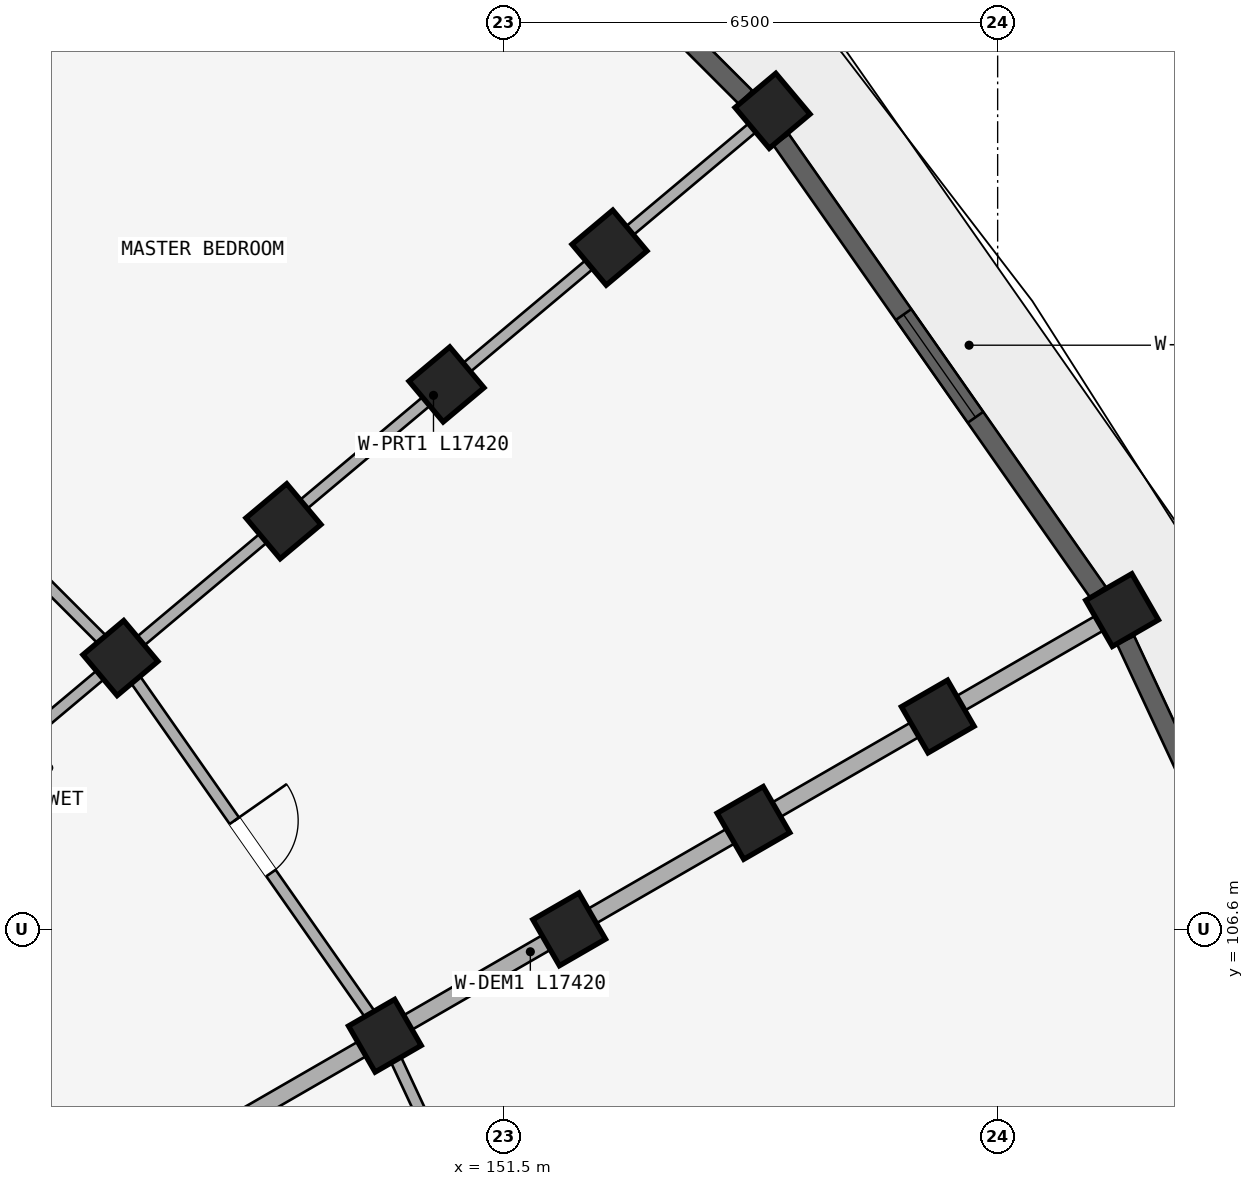
"""IFC4 building model, lengths in metres.
Left out: names, types, materials, properties, quantities, classifications, styles, units other than length and angle.
Written with IfcOpenShell. Run it as: python <this file> out.ifc"""

import sys

from ifc_helpers import new_model, si_unit, direction, frame, frame_2d, origin, origin_2d, place, context, subcontext, project, spatial, rectangle, extrude, element, fill, save


model = new_model("IFC4")
c1 = context("Model", 3, precision=1e-05, world=origin(), true_north=direction((0.0, 1.0)))
c2 = subcontext(c1, "Body", "Model", "MODEL_VIEW")
j1 = project(units=[si_unit("LENGTHUNIT", "METRE"), si_unit("PLANEANGLEUNIT", "RADIAN")], contexts=[c1])
p1 = place(None, origin())
s1 = spatial("IfcSite", under=j1, at=p1, CompositionType="ELEMENT")
p2 = place(p1, origin())
s2 = spatial("IfcBuilding", under=s1, at=p2, CompositionType="ELEMENT")
p3 = place(p2, frame((0.0, 0.0, 27.6)))
s3 = spatial("IfcBuildingStorey", under=s2, at=p3, CompositionType="ELEMENT", Elevation=27.6)
for number, where, z_axis, x_axis in (
    (1, (146.458, 110.169, 0.0), (0.0, 0.0, 1.0), (-0.643, 0.766, 0.0)),
    (2, (148.603, 111.969, 0.0), (0.0, 0.0, 1.0), (-0.643, 0.766, 0.0)),
    (3, (150.748, 113.769, 0.0), (0.0, 0.0, 1.0), (-0.643, 0.766, 0.0)),
    (4, (152.893, 115.568, 0.0), (0.0, 0.0, 1.0), (-0.643, 0.766, 0.0)),
):
    element("IfcColumn", number, at=place(p3, frame(where, z_axis=z_axis, x_axis=x_axis)), inside=s3, PredefinedType="COLUMN", context=c2, shape_type="SweptSolid", body=[
        extrude(rectangle(XDim=0.7, YDim=0.7, at=origin_2d()), origin(), (0.0, 0.0, 1.0), 2.93),
    ])
p4 = place(p3, frame((155.038, 117.368, 0.0), z_axis=(0.0, 0.0, 1.0), x_axis=(-0.642787609687, 0.766044443119, 0.0)))
e5 = element("IfcColumn", 5, at=p4, inside=s3, PredefinedType="COLUMN", context=c2, shape_type="SweptSolid", body=[
    extrude(rectangle(XDim=0.7, YDim=0.7, at=origin_2d()), origin(), (0.0, 0.0, 1.0), 2.97),
])
for number, where, z_axis, x_axis in (
    (6, (149.938, 105.2, 0.0), (0.0, 0.0, 1.0), (-0.5, 0.866, 0.0)),
    (7, (152.363, 106.6, 0.0), (0.0, 0.0, 1.0), (-0.5, 0.866, 0.0)),
    (8, (154.787, 108.0, 0.0), (0.0, 0.0, 1.0), (-0.5, 0.866, 0.0)),
    (9, (157.212, 109.4, 0.0), (0.0, 0.0, 1.0), (-0.5, 0.866, 0.0)),
):
    element("IfcColumn", number, at=place(p3, frame(where, z_axis=z_axis, x_axis=x_axis)), inside=s3, PredefinedType="COLUMN", context=c2, shape_type="SweptSolid", body=[
        extrude(rectangle(XDim=0.7, YDim=0.7, at=origin_2d()), origin(), (0.0, 0.0, 1.0), 2.93),
    ])
p5 = place(p3, frame((159.637, 110.8, 0.0), z_axis=(0.0, 0.0, 1.0), x_axis=(-0.5, 0.866025403784, 0.0)))
e10 = element("IfcColumn", 10, at=p5, inside=s3, PredefinedType="COLUMN", context=c2, shape_type="SweptSolid", body=[
    extrude(rectangle(XDim=0.7, YDim=0.7, at=origin_2d()), origin(), (0.0, 0.0, 1.0), 2.97),
])
p6 = place(p3, frame((137.991, 109.479, 0.0), z_axis=(0.0, 0.0, 1.0), x_axis=(0.642784757967, 0.766046835987, 0.0)))
e11 = element("IfcWall", 11, at=p6, inside=s3, PredefinedType="STANDARD", context=c2, shape_type="SweptSolid", body=[
    extrude(rectangle(XDim=17.42, YDim=0.22, at=frame_2d((8.71, 0.0))), origin(), (0.0, 0.0, 1.0), 2.372),
])
p7 = place(p3, frame((141.479, 105.991, 0.0), z_axis=(0.0, 0.0, 1.0), x_axis=(0.766046835987, 0.642784757967, 0.0)))
e12 = element("IfcWall", 12, at=p7, inside=s3, PredefinedType="PARTITIONING", context=c2, shape_type="SweptSolid", body=[
    extrude(rectangle(XDim=17.42, YDim=0.15, at=frame_2d((8.71, 0.0))), origin(), (0.0, 0.0, 1.0), 2.372),
])
p8 = place(p7, frame((4.45, 0.0, 0.0)))
e13 = element("IfcOpeningElement", 13, at=p8, cuts=e12, PredefinedType="OPENING", context=c2, shape_type="SweptSolid", body=[
    extrude(rectangle(XDim=0.8, YDim=2.1, at=frame_2d((0.4, 1.05))), frame((0.0, 0.085, 0.0), z_axis=(0.0, -1.0, 0.0), x_axis=(1.0, 0.0, 0.0)), (0.0, 0.0, 1.0), 0.17),
])
p9 = place(p3, frame((144.309, 101.95, 0.0), z_axis=(0.0, 0.0, 1.0), x_axis=(0.866026648973, 0.499997843263, 0.0)))
e14 = element("IfcWall", 14, at=p9, inside=s3, PredefinedType="STANDARD", context=c2, shape_type="SweptSolid", body=[
    extrude(rectangle(XDim=17.42, YDim=0.22, at=frame_2d((8.71, 0.0))), origin(), (0.0, 0.0, 1.0), 2.372),
])
p10 = place(p3, frame((142.169, 114.458, 0.0), z_axis=(0.0, 0.0, 1.0), x_axis=(0.707106781187, -0.707106781187, 0.0)))
e15 = element("IfcWall", 15, at=p10, inside=s3, PredefinedType="PLUMBINGWALL", context=c2, shape_type="SweptSolid", body=[
    extrude(rectangle(XDim=6.066, YDim=0.15, at=frame_2d((3.033, 0.0))), origin(), (0.0, 0.0, 1.0), 2.372),
])
p11 = place(p10, frame((2.633, 0.0, 0.0)))
e16 = element("IfcOpeningElement", 16, at=p11, cuts=e15, PredefinedType="OPENING", context=c2, shape_type="SweptSolid", body=[
    extrude(rectangle(XDim=0.8, YDim=2.1, at=frame_2d((0.4, 1.05))), frame((0.0, 0.085, 0.0), z_axis=(0.0, -1.0, 0.0), x_axis=(1.0, 0.0, 0.0)), (0.0, 0.0, 1.0), 0.17),
])
p12 = place(p3, frame((146.458, 110.169, 0.0), z_axis=(0.0, 0.0, 1.0), x_axis=(0.573594691504, -0.81913926159, 0.0)))
e17 = element("IfcWall", 17, at=p12, inside=s3, PredefinedType="PLUMBINGWALL", context=c2, shape_type="SweptSolid", body=[
    extrude(rectangle(XDim=6.066, YDim=0.15, at=frame_2d((3.033, 0.0))), origin(), (0.0, 0.0, 1.0), 2.372),
])
p13 = place(p12, frame((2.613, 0.0, 0.0)))
e18 = element("IfcOpeningElement", 18, at=p13, cuts=e17, PredefinedType="OPENING", context=c2, shape_type="SweptSolid", body=[
    extrude(rectangle(XDim=0.84, YDim=2.1, at=frame_2d((0.42, 1.05))), frame((0.0, 0.085, 0.0), z_axis=(0.0, -1.0, 0.0), x_axis=(1.0, 0.0, 0.0)), (0.0, 0.0, 1.0), 0.17),
])
p14 = place(p3, frame((149.938, 105.2, 0.0), z_axis=(0.0, 0.0, 1.0), x_axis=(0.42260781991, -0.906312656069, 0.0)))
e19 = element("IfcWall", 19, at=p14, inside=s3, PredefinedType="PLUMBINGWALL", context=c2, shape_type="SweptSolid", body=[
    extrude(rectangle(XDim=6.066, YDim=0.15, at=frame_2d((3.033, 0.0))), origin(), (0.0, 0.0, 1.0), 2.372),
])
p15 = place(p14, frame((2.653, 0.0, 0.0)))
e20 = element("IfcOpeningElement", 20, at=p15, cuts=e19, PredefinedType="OPENING", context=c2, shape_type="SweptSolid", body=[
    extrude(rectangle(XDim=0.76, YDim=2.05, at=frame_2d((0.38, 1.025))), frame((0.0, 0.085, 0.0), z_axis=(0.0, -1.0, 0.0), x_axis=(1.0, 0.0, 0.0)), (0.0, 0.0, 1.0), 0.17),
])
p16 = place(p3, frame((149.546, 122.684, 0.0), z_axis=(0.0, 0.0, 1.0), x_axis=(0.707106781187, -0.707106781187, 0.0)))
e21 = element("IfcWall", 21, at=p16, inside=s3, PredefinedType="STANDARD", context=c2, shape_type="SweptSolid", body=[
    extrude(rectangle(XDim=7.267, YDim=0.25, at=frame_2d((3.633, 0.0))), origin(), (0.0, 0.0, 1.0), 2.48),
])
p17 = place(p16, frame((4.766, 0.0, 0.63)))
e22 = element("IfcOpeningElement", 22, at=p17, cuts=e21, PredefinedType="OPENING", context=c2, shape_type="SweptSolid", body=[
    extrude(rectangle(XDim=1.2, YDim=1.5, at=frame_2d((0.6, 0.75))), frame((0.0, 0.135, 0.0), z_axis=(0.0, -1.0, 0.0), x_axis=(1.0, 0.0, 0.0)), (0.0, 0.0, 1.0), 0.27),
])
p18 = place(p16, frame((1.913, 0.0, 0.0)))
e23 = element("IfcOpeningElement", 23, at=p18, cuts=e21, PredefinedType="OPENING", context=c2, shape_type="SweptSolid", body=[
    extrude(rectangle(XDim=1.26, YDim=2.15, at=frame_2d((0.63, 1.075))), frame((0.0, 0.135, 0.0), z_axis=(0.0, -1.0, 0.0), x_axis=(1.0, 0.0, 0.0)), (0.0, 0.0, 1.0), 0.27),
])
p19 = place(p3, frame((155.151, 116.989, 0.0), z_axis=(0.0, 0.0, 1.0), x_axis=(0.573566061701, -0.819159308599, 0.0)))
e24 = element("IfcWall", 24, at=p19, inside=s3, PredefinedType="STANDARD", context=c2, shape_type="SweptSolid", body=[
    extrude(rectangle(XDim=7.267, YDim=0.25, at=frame_2d((3.633, 0.0))), origin(), (0.0, 0.0, 1.0), 2.48),
])
p20 = place(p19, frame((2.808, 0.0, 0.53)))
e25 = element("IfcOpeningElement", 25, at=p20, cuts=e24, PredefinedType="OPENING", context=c2, shape_type="SweptSolid", body=[
    extrude(rectangle(XDim=1.65, YDim=1.75, at=frame_2d((0.825, 0.875))), frame((0.0, 0.135, 0.0), z_axis=(0.0, -1.0, 0.0), x_axis=(1.0, 0.0, 0.0)), (0.0, 0.0, 1.0), 0.27),
])
p21 = place(p3, frame((159.683, 110.406, 0.0), z_axis=(0.0, 0.0, 1.0), x_axis=(0.422627946127, -0.90630327107, 0.0)))
e26 = element("IfcWall", 26, at=p21, inside=s3, PredefinedType="STANDARD", context=c2, shape_type="SweptSolid", body=[
    extrude(rectangle(XDim=7.267, YDim=0.25, at=frame_2d((3.633, 0.0))), origin(), (0.0, 0.0, 1.0), 2.48),
])
p22 = place(p21, frame((2.508, 0.0, 0.33)))
e27 = element("IfcOpeningElement", 27, at=p22, cuts=e26, PredefinedType="OPENING", context=c2, shape_type="SweptSolid", body=[
    extrude(rectangle(XDim=2.25, YDim=1.95, at=frame_2d((1.125, 0.975))), frame((0.0, 0.135, 0.0), z_axis=(0.0, -1.0, 0.0), x_axis=(1.0, 0.0, 0.0)), (0.0, 0.0, 1.0), 0.27),
])
p23 = place(p20, origin())
e28 = element("IfcWindow", 28, at=p23, inside=s3, PartitioningType="DOUBLE_PANEL_VERTICAL", PredefinedType="WINDOW", context=c2, shape_type="SweptSolid", body=[
    extrude(rectangle(XDim=1.65, YDim=1.75, at=frame_2d((0.825, 0.875))), frame((0.0, 0.03, 0.0), z_axis=(0.0, -1.0, 0.0), x_axis=(1.0, 0.0, 0.0)), (0.0, 0.0, 1.0), 0.06),
])
fill(e25, e28)
p24 = place(p13, origin())
e29 = element("IfcDoor", 29, at=p24, inside=s3, OperationType="SINGLE_SWING_LEFT", PredefinedType="DOOR", context=c2, shape_type="SweptSolid", body=[
    extrude(rectangle(XDim=0.84, YDim=2.1, at=frame_2d((0.42, 1.05))), frame((0.0, 0.025, 0.0), z_axis=(0.0, -1.0, 0.0), x_axis=(1.0, 0.0, 0.0)), (0.0, 0.0, 1.0), 0.05),
])
fill(e18, e29)
save(model, sys.argv[1])
